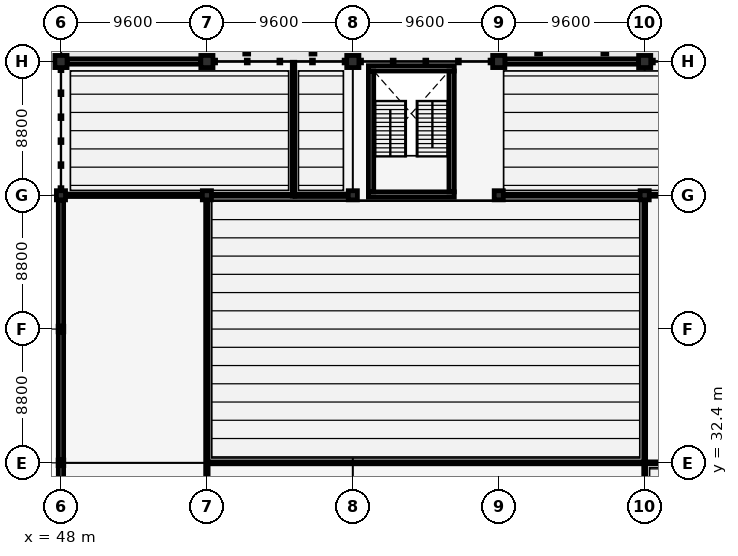
"""IFC4 building model, lengths in metres.
Left out: names, types, materials, properties, quantities, classifications, styles, units other than length and angle.
Written with IfcOpenShell. Run it as: python <this file> out.ifc"""

import sys

from ifc_helpers import new_model, si_unit, direction, frame, frame_2d, origin, origin_2d, place, context, subcontext, project, spatial, rectangle, hollow_rectangle, i_section, extrude, element, fill, save


model = new_model("IFC4")
c1 = context("Model", 3, precision=1e-05, world=origin(), true_north=direction((0.0, 1.0)))
c2 = subcontext(c1, "Body", "Model", "MODEL_VIEW")
j1 = project(units=[si_unit("LENGTHUNIT", "METRE"), si_unit("PLANEANGLEUNIT", "RADIAN")], contexts=[c1])
p1 = place(None, origin())
s1 = spatial("IfcSite", under=j1, at=p1, CompositionType="ELEMENT")
p2 = place(p1, origin())
s2 = spatial("IfcBuilding", under=s1, at=p2, CompositionType="ELEMENT")
p3 = place(p2, origin())
s3 = spatial("IfcBuildingStorey", under=s2, at=p3, CompositionType="ELEMENT", Elevation=0.0)
for number, where, z_axis, x_axis in (
    (1, (48.0, 32.4, 0.0), (0.0, 0.0, 1.0), (1.0, 0.0, 0.0)),
    (2, (48.0, 41.2, 0.0), (0.0, 0.0, 1.0), (1.0, 0.0, 0.0)),
):
    element("IfcColumn", number, at=place(p3, frame(where, z_axis=z_axis, x_axis=x_axis)), inside=s3, PredefinedType="COLUMN", context=c2, shape_type="SweptSolid", body=[
        extrude(i_section(OverallWidth=0.368, OverallDepth=0.368, WebThickness=0.015, FlangeThickness=0.024, FilletRadius=0.025, at=origin_2d()), origin(), (0.0, 0.0, 1.0), 4.8),
    ])
p4 = place(p3, frame((48.0, 50.0, 0.0), z_axis=(0.0, 0.0, 1.0), x_axis=(1.0, 0.0, 0.0)))
e3 = element("IfcColumn", 3, at=p4, inside=s3, PredefinedType="COLUMN", context=c2, shape_type="SweptSolid", body=[
    extrude(rectangle(XDim=0.6, YDim=0.6, at=origin_2d()), origin(), (0.0, 0.0, 1.0), 4.8),
])
p5 = place(p3, frame((48.0, 58.8, 0.0), z_axis=(0.0, 0.0, 1.0), x_axis=(1.0, 0.0, 0.0)))
e4 = element("IfcColumn", 4, at=p5, inside=s3, PredefinedType="COLUMN", context=c2, shape_type="SweptSolid", body=[
    extrude(rectangle(XDim=0.8, YDim=0.8, at=origin_2d()), origin(), (0.0, 0.0, 1.0), 4.8),
])
p6 = place(p3, frame((57.6, 50.0, 0.0), z_axis=(0.0, 0.0, 1.0), x_axis=(1.0, 0.0, 0.0)))
e5 = element("IfcColumn", 5, at=p6, inside=s3, PredefinedType="COLUMN", context=c2, shape_type="SweptSolid", body=[
    extrude(rectangle(XDim=0.6, YDim=0.6, at=origin_2d()), origin(), (0.0, 0.0, 1.0), 4.8),
])
p7 = place(p3, frame((57.6, 58.8, 0.0), z_axis=(0.0, 0.0, 1.0), x_axis=(1.0, 0.0, 0.0)))
e6 = element("IfcColumn", 6, at=p7, inside=s3, PredefinedType="COLUMN", context=c2, shape_type="SweptSolid", body=[
    extrude(rectangle(XDim=0.8, YDim=0.8, at=origin_2d()), origin(), (0.0, 0.0, 1.0), 4.8),
])
p8 = place(p3, frame((67.2, 50.0, 0.0), z_axis=(0.0, 0.0, 1.0), x_axis=(1.0, 0.0, 0.0)))
e7 = element("IfcColumn", 7, at=p8, inside=s3, PredefinedType="COLUMN", context=c2, shape_type="SweptSolid", body=[
    extrude(rectangle(XDim=0.6, YDim=0.6, at=origin_2d()), origin(), (0.0, 0.0, 1.0), 4.8),
])
p9 = place(p3, frame((67.2, 58.8, 0.0), z_axis=(0.0, 0.0, 1.0), x_axis=(1.0, 0.0, 0.0)))
e8 = element("IfcColumn", 8, at=p9, inside=s3, PredefinedType="COLUMN", context=c2, shape_type="SweptSolid", body=[
    extrude(rectangle(XDim=0.8, YDim=0.8, at=origin_2d()), origin(), (0.0, 0.0, 1.0), 4.8),
])
p10 = place(p3, frame((76.8, 50.0, 0.0), z_axis=(0.0, 0.0, 1.0), x_axis=(1.0, 0.0, 0.0)))
e9 = element("IfcColumn", 9, at=p10, inside=s3, PredefinedType="COLUMN", context=c2, shape_type="SweptSolid", body=[
    extrude(rectangle(XDim=0.6, YDim=0.6, at=origin_2d()), origin(), (0.0, 0.0, 1.0), 4.8),
])
p11 = place(p3, frame((76.8, 58.8, 0.0), z_axis=(0.0, 0.0, 1.0), x_axis=(1.0, 0.0, 0.0)))
e10 = element("IfcColumn", 10, at=p11, inside=s3, PredefinedType="COLUMN", context=c2, shape_type="SweptSolid", body=[
    extrude(rectangle(XDim=0.8, YDim=0.8, at=origin_2d()), origin(), (0.0, 0.0, 1.0), 4.8),
])
p12 = place(p3, frame((86.4, 50.0, 0.0), z_axis=(0.0, 0.0, 1.0), x_axis=(1.0, 0.0, 0.0)))
e11 = element("IfcColumn", 11, at=p12, inside=s3, PredefinedType="COLUMN", context=c2, shape_type="SweptSolid", body=[
    extrude(rectangle(XDim=0.6, YDim=0.6, at=origin_2d()), origin(), (0.0, 0.0, 1.0), 4.8),
])
p13 = place(p3, frame((86.4, 58.8, 0.0), z_axis=(0.0, 0.0, 1.0), x_axis=(1.0, 0.0, 0.0)))
e12 = element("IfcColumn", 12, at=p13, inside=s3, PredefinedType="COLUMN", context=c2, shape_type="SweptSolid", body=[
    extrude(rectangle(XDim=0.8, YDim=0.8, at=origin_2d()), origin(), (0.0, 0.0, 1.0), 4.8),
])
p14 = place(p3, frame((48.4, 58.8, 0.0), z_axis=(0.0, 0.0, 1.0), x_axis=(1.0, 0.0, 0.0)))
e13 = element("IfcWall", 13, at=p14, inside=s3, PredefinedType="SOLIDWALL", context=c2, shape_type="SweptSolid", body=[
    extrude(rectangle(XDim=8.8, YDim=0.35, at=frame_2d((4.4, 0.0))), origin(), (0.0, 0.0, 1.0), 4.1),
])
p15 = place(p14, frame((1.4, 0.0, 0.0)))
e14 = element("IfcOpeningElement", 14, at=p15, cuts=e13, PredefinedType="OPENING", context=c2, shape_type="SweptSolid", body=[
    extrude(rectangle(XDim=1.96, YDim=2.37, at=frame_2d((0.98, 1.185))), frame((0.0, 0.185, 0.0), z_axis=(0.0, -1.0, 0.0), x_axis=(1.0, 0.0, 0.0)), (0.0, 0.0, 1.0), 0.37),
])
p16 = place(p14, frame((4.8, 0.0, 0.0)))
e15 = element("IfcOpeningElement", 15, at=p16, cuts=e13, PredefinedType="OPENING", context=c2, shape_type="SweptSolid", body=[
    extrude(rectangle(XDim=1.72, YDim=2.34, at=frame_2d((0.86, 1.17))), frame((0.0, 0.185, 0.0), z_axis=(0.0, -1.0, 0.0), x_axis=(1.0, 0.0, 0.0)), (0.0, 0.0, 1.0), 0.37),
])
p17 = place(p3, frame((77.2, 58.8, 0.0), z_axis=(0.0, 0.0, 1.0), x_axis=(1.0, 0.0, 0.0)))
e16 = element("IfcWall", 16, at=p17, inside=s3, PredefinedType="SOLIDWALL", context=c2, shape_type="SweptSolid", body=[
    extrude(rectangle(XDim=8.8, YDim=0.35, at=frame_2d((4.4, 0.0))), origin(), (0.0, 0.0, 1.0), 4.1),
])
p18 = place(p17, frame((1.4, 0.0, 0.0)))
e17 = element("IfcOpeningElement", 17, at=p18, cuts=e16, PredefinedType="OPENING", context=c2, shape_type="SweptSolid", body=[
    extrude(rectangle(XDim=1.96, YDim=2.37, at=frame_2d((0.98, 1.185))), frame((0.0, 0.185, 0.0), z_axis=(0.0, -1.0, 0.0), x_axis=(1.0, 0.0, 0.0)), (0.0, 0.0, 1.0), 0.37),
])
p19 = place(p17, frame((4.8, 0.0, 0.0)))
e18 = element("IfcOpeningElement", 18, at=p19, cuts=e16, PredefinedType="OPENING", context=c2, shape_type="SweptSolid", body=[
    extrude(rectangle(XDim=1.72, YDim=2.34, at=frame_2d((0.86, 1.17))), frame((0.0, 0.185, 0.0), z_axis=(0.0, -1.0, 0.0), x_axis=(1.0, 0.0, 0.0)), (0.0, 0.0, 1.0), 0.37),
])
p20 = place(p3, frame((48.0, 23.784, 0.0), z_axis=(0.0, 0.0, 1.0), x_axis=(0.0, 1.0, 0.0)))
e19 = element("IfcWall", 19, at=p20, inside=s3, PredefinedType="SOLIDWALL", context=c2, shape_type="SweptSolid", body=[
    extrude(rectangle(XDim=8.432, YDim=0.35, at=frame_2d((4.216, 0.0))), origin(), (0.0, 0.0, 1.0), 4.1),
])
p21 = place(p20, frame((1.4, 0.0, 0.0)))
e20 = element("IfcOpeningElement", 20, at=p21, cuts=e19, PredefinedType="OPENING", context=c2, shape_type="SweptSolid", body=[
    extrude(rectangle(XDim=1.96, YDim=2.37, at=frame_2d((0.98, 1.185))), frame((0.0, 0.185, 0.0), z_axis=(0.0, -1.0, 0.0), x_axis=(1.0, 0.0, 0.0)), (0.0, 0.0, 1.0), 0.37),
])
p22 = place(p20, frame((4.6, 0.0, 0.0)))
e21 = element("IfcOpeningElement", 21, at=p22, cuts=e19, PredefinedType="OPENING", context=c2, shape_type="SweptSolid", body=[
    extrude(rectangle(XDim=1.72, YDim=2.34, at=frame_2d((0.86, 1.17))), frame((0.0, 0.185, 0.0), z_axis=(0.0, -1.0, 0.0), x_axis=(1.0, 0.0, 0.0)), (0.0, 0.0, 1.0), 0.37),
])
p23 = place(p3, frame((48.0, 32.584, 0.0), z_axis=(0.0, 0.0, 1.0), x_axis=(0.0, 1.0, 0.0)))
e22 = element("IfcWall", 22, at=p23, inside=s3, PredefinedType="SOLIDWALL", context=c2, shape_type="SweptSolid", body=[
    extrude(rectangle(XDim=8.432, YDim=0.35, at=frame_2d((4.216, 0.0))), origin(), (0.0, 0.0, 1.0), 4.1),
])
p24 = place(p23, frame((1.4, 0.0, 0.0)))
e23 = element("IfcOpeningElement", 23, at=p24, cuts=e22, PredefinedType="OPENING", context=c2, shape_type="SweptSolid", body=[
    extrude(rectangle(XDim=1.88, YDim=2.31, at=frame_2d((0.94, 1.155))), frame((0.0, 0.185, 0.0), z_axis=(0.0, -1.0, 0.0), x_axis=(1.0, 0.0, 0.0)), (0.0, 0.0, 1.0), 0.37),
])
p25 = place(p23, frame((4.6, 0.0, 0.0)))
e24 = element("IfcOpeningElement", 24, at=p25, cuts=e22, PredefinedType="OPENING", context=c2, shape_type="SweptSolid", body=[
    extrude(rectangle(XDim=1.8, YDim=2.4, at=frame_2d((0.9, 1.2))), frame((0.0, 0.185, 0.0), z_axis=(0.0, -1.0, 0.0), x_axis=(1.0, 0.0, 0.0)), (0.0, 0.0, 1.0), 0.37),
])
p26 = place(p3, frame((48.0, 41.384, 0.0), z_axis=(0.0, 0.0, 1.0), x_axis=(0.0, 1.0, 0.0)))
e25 = element("IfcWall", 25, at=p26, inside=s3, PredefinedType="SOLIDWALL", context=c2, shape_type="SweptSolid", body=[
    extrude(rectangle(XDim=8.316, YDim=0.35, at=frame_2d((4.158, 0.0))), origin(), (0.0, 0.0, 1.0), 4.1),
])
p27 = place(p26, frame((1.4, 0.0, 0.0)))
e26 = element("IfcOpeningElement", 26, at=p27, cuts=e25, PredefinedType="OPENING", context=c2, shape_type="SweptSolid", body=[
    extrude(rectangle(XDim=1.96, YDim=2.37, at=frame_2d((0.98, 1.185))), frame((0.0, 0.185, 0.0), z_axis=(0.0, -1.0, 0.0), x_axis=(1.0, 0.0, 0.0)), (0.0, 0.0, 1.0), 0.37),
])
p28 = place(p26, frame((4.6, 0.0, 0.0)))
e27 = element("IfcOpeningElement", 27, at=p28, cuts=e25, PredefinedType="OPENING", context=c2, shape_type="SweptSolid", body=[
    extrude(rectangle(XDim=1.72, YDim=2.34, at=frame_2d((0.86, 1.17))), frame((0.0, 0.185, 0.0), z_axis=(0.0, -1.0, 0.0), x_axis=(1.0, 0.0, 0.0)), (0.0, 0.0, 1.0), 0.37),
])
for number, where, z_axis, x_axis in (
    (28, (60.22, 59.42, 0.0), (0.0, 0.0, 1.0), (1.0, 0.0, 0.0)),
    (29, (64.58, 59.42, 0.0), (0.0, 0.0, 1.0), (1.0, 0.0, 0.0)),
    (30, (79.42, 59.42, 0.0), (0.0, 0.0, 1.0), (1.0, 0.0, 0.0)),
    (31, (83.78, 59.42, 0.0), (0.0, 0.0, 1.0), (1.0, 0.0, 0.0)),
):
    element("IfcColumn", number, at=place(p3, frame(where, z_axis=z_axis, x_axis=x_axis)), inside=s3, PredefinedType="COLUMN", context=c2, shape_type="SweptSolid", body=[
        extrude(hollow_rectangle(XDim=0.254, YDim=0.254, WallThickness=0.012, at=origin_2d()), origin(), (0.0, 0.0, 1.0), 3.47),
    ])
for number, where, z_axis, x_axis in (
    (32, (73.875, 50.05, 0.0), (0.0, 0.0, 1.0), (-1.0, 0.0, 0.0)),
    (33, (68.225, 58.35, 0.0), (0.0, 0.0, 1.0), (1.0, 0.0, 0.0)),
):
    element("IfcWall", number, at=place(p3, frame(where, z_axis=z_axis, x_axis=x_axis)), inside=s3, PredefinedType="SHEAR", context=c2, shape_type="SweptSolid", body=[
        extrude(rectangle(XDim=5.65, YDim=0.35, at=frame_2d((2.825, 0.0))), origin(), (0.0, 0.0, 1.0), 4.55),
    ])
p29 = place(p3, frame((68.4, 50.225, 0.0), z_axis=(0.0, 0.0, 1.0), x_axis=(0.0, 1.0, 0.0)))
e34 = element("IfcWall", 34, at=p29, inside=s3, PredefinedType="SHEAR", context=c2, shape_type="SweptSolid", body=[
    extrude(rectangle(XDim=7.95, YDim=0.35, at=frame_2d((3.975, 0.0))), origin(), (0.0, 0.0, 1.0), 4.55),
])
p30 = place(p29, frame((0.22, 0.0, 0.0)))
e35 = element("IfcOpeningElement", 35, at=p30, cuts=e34, PredefinedType="OPENING", context=c2, shape_type="SweptSolid", body=[
    extrude(rectangle(XDim=2.05, YDim=2.15, at=frame_2d((1.025, 1.075))), frame((0.0, 0.185, 0.0), z_axis=(0.0, -1.0, 0.0), x_axis=(1.0, 0.0, 0.0)), (0.0, 0.0, 1.0), 0.37),
])
p31 = place(p3, frame((73.7, 58.175, 0.0), z_axis=(0.0, 0.0, 1.0), x_axis=(0.0, -1.0, 0.0)))
e36 = element("IfcWall", 36, at=p31, inside=s3, PredefinedType="SHEAR", context=c2, shape_type="SweptSolid", body=[
    extrude(rectangle(XDim=7.95, YDim=0.35, at=frame_2d((3.975, 0.0))), origin(), (0.0, 0.0, 1.0), 4.55),
])
p32 = place(p3, frame((86.4, 14.9, 0.0), z_axis=(0.0, 0.0, 1.0), x_axis=(0.0, 1.0, 0.0)))
e37 = element("IfcWall", 37, at=p32, inside=s3, PredefinedType="PARTITIONING", context=c2, shape_type="SweptSolid", body=[
    extrude(rectangle(XDim=17.4, YDim=0.125, at=frame_2d((8.7, 0.0))), origin(), (0.0, 0.0, 1.0), 4.42),
])
p33 = place(p3, frame((57.7, 32.4, 0.0), z_axis=(0.0, 0.0, 1.0), x_axis=(1.0, 0.0, 0.0)))
e38 = element("IfcWall", 38, at=p33, inside=s3, PredefinedType="PARTITIONING", context=c2, shape_type="SweptSolid", body=[
    extrude(rectangle(XDim=28.6, YDim=0.125, at=frame_2d((14.3, 0.0))), origin(), (0.0, 0.0, 1.0), 4.42),
])
p34 = place(p3, frame((57.6, 15.4, 0.0), z_axis=(0.0, 0.0, 1.0), x_axis=(0.0, 1.0, 0.0)))
e39 = element("IfcWall", 39, at=p34, inside=s3, PredefinedType="PARTITIONING", context=c2, shape_type="SweptSolid", body=[
    extrude(rectangle(XDim=16.9, YDim=0.16, at=frame_2d((8.45, 0.0))), origin(), (0.0, 0.0, 1.0), 4.42),
])
p35 = place(p34, frame((7.55, 0.0, 0.0)))
e40 = element("IfcOpeningElement", 40, at=p35, cuts=e39, PredefinedType="OPENING", context=c2, shape_type="SweptSolid", body=[
    extrude(rectangle(XDim=1.8, YDim=2.15, at=frame_2d((0.9, 1.075))), frame((0.0, 0.09, 0.0), z_axis=(0.0, -1.0, 0.0), x_axis=(1.0, 0.0, 0.0)), (0.0, 0.0, 1.0), 0.18),
])
p36 = place(p3, frame((86.5, 32.4, 0.0), z_axis=(0.0, 0.0, 1.0), x_axis=(1.0, 0.0, 0.0)))
e41 = element("IfcWall", 41, at=p36, inside=s3, PredefinedType="PARTITIONING", context=c2, shape_type="SweptSolid", body=[
    extrude(rectangle(XDim=28.65, YDim=0.125, at=frame_2d((14.325, 0.0))), origin(), (0.0, 0.0, 1.0), 4.42),
])
p37 = place(p3, frame((86.4, 32.5, 0.0), z_axis=(0.0, 0.0, 1.0), x_axis=(0.0, 1.0, 0.0)))
e42 = element("IfcWall", 42, at=p37, inside=s3, PredefinedType="PARTITIONING", context=c2, shape_type="SweptSolid", body=[
    extrude(rectangle(XDim=17.45, YDim=0.125, at=frame_2d((8.725, 0.0))), origin(), (0.0, 0.0, 1.0), 4.42),
])
p38 = place(p3, frame((76.9, 50.0, 0.0), z_axis=(0.0, 0.0, 1.0), x_axis=(1.0, 0.0, 0.0)))
e43 = element("IfcWall", 43, at=p38, inside=s3, PredefinedType="PARTITIONING", context=c2, shape_type="SweptSolid", body=[
    extrude(rectangle(XDim=9.4, YDim=0.125, at=frame_2d((4.7, 0.0))), origin(), (0.0, 0.0, 1.0), 3.925),
])
p39 = place(p3, frame((57.7, 50.0, 0.0), z_axis=(0.0, 0.0, 1.0), x_axis=(1.0, 0.0, 0.0)))
e44 = element("IfcWall", 44, at=p39, inside=s3, PredefinedType="PARTITIONING", context=c2, shape_type="SweptSolid", body=[
    extrude(rectangle(XDim=5.5, YDim=0.125, at=frame_2d((2.75, 0.0))), origin(), (0.0, 0.0, 1.0), 3.925),
])
p40 = place(p3, frame((57.6, 32.5, 0.0), z_axis=(0.0, 0.0, 1.0), x_axis=(0.0, 1.0, 0.0)))
e45 = element("IfcWall", 45, at=p40, inside=s3, PredefinedType="PARTITIONING", context=c2, shape_type="SweptSolid", body=[
    extrude(rectangle(XDim=17.45, YDim=0.16, at=frame_2d((8.725, 0.0))), origin(), (0.0, 0.0, 1.0), 4.42),
])
p41 = place(p40, frame((7.825, 0.0, 0.0)))
e46 = element("IfcOpeningElement", 46, at=p41, cuts=e45, PredefinedType="OPENING", context=c2, shape_type="SweptSolid", body=[
    extrude(rectangle(XDim=1.8, YDim=2.15, at=frame_2d((0.9, 1.075))), frame((0.0, 0.09, 0.0), z_axis=(0.0, -1.0, 0.0), x_axis=(1.0, 0.0, 0.0)), (0.0, 0.0, 1.0), 0.18),
])
p42 = place(p3, frame((63.4, 50.0, 0.0), z_axis=(0.0, 0.0, 1.0), x_axis=(1.0, 0.0, 0.0)))
e47 = element("IfcWall", 47, at=p42, inside=s3, PredefinedType="PARTITIONING", context=c2, shape_type="SweptSolid", body=[
    extrude(rectangle(XDim=3.4, YDim=0.16, at=frame_2d((1.7, 0.0))), origin(), (0.0, 0.0, 1.0), 3.925),
])
p43 = place(p42, frame((0.712, 0.0, 0.0)))
e48 = element("IfcOpeningElement", 48, at=p43, cuts=e47, PredefinedType="OPENING", context=c2, shape_type="SweptSolid", body=[
    extrude(rectangle(XDim=1.8, YDim=2.15, at=frame_2d((0.9, 1.075))), frame((0.0, 0.09, 0.0), z_axis=(0.0, -1.0, 0.0), x_axis=(1.0, 0.0, 0.0)), (0.0, 0.0, 1.0), 0.18),
])
p44 = place(p3, frame((86.5, 50.0, 0.0), z_axis=(0.0, 0.0, 1.0), x_axis=(1.0, 0.0, 0.0)))
e49 = element("IfcWall", 49, at=p44, inside=s3, PredefinedType="PARTITIONING", context=c2, shape_type="SweptSolid", body=[
    extrude(rectangle(XDim=24.3, YDim=0.125, at=frame_2d((12.15, 0.0))), origin(), (0.0, 0.0, 1.0), 3.925),
])
p45 = place(p3, frame((48.05, 50.0, 0.0), z_axis=(0.0, 0.0, 1.0), x_axis=(1.0, 0.0, 0.0)))
e50 = element("IfcWall", 50, at=p45, inside=s3, PredefinedType="PARTITIONING", context=c2, shape_type="SweptSolid", body=[
    extrude(rectangle(XDim=9.45, YDim=0.16, at=frame_2d((4.725, 0.0))), origin(), (0.0, 0.0, 1.0), 3.925),
])
p46 = place(p45, frame((3.825, 0.0, 0.0)))
e51 = element("IfcOpeningElement", 51, at=p46, cuts=e50, PredefinedType="OPENING", context=c2, shape_type="SweptSolid", body=[
    extrude(rectangle(XDim=1.8, YDim=2.15, at=frame_2d((0.9, 1.075))), frame((0.0, 0.09, 0.0), z_axis=(0.0, -1.0, 0.0), x_axis=(1.0, 0.0, 0.0)), (0.0, 0.0, 1.0), 0.18),
])
p47 = place(p3, frame((63.3, 49.95, 0.0), z_axis=(0.0, 0.0, 1.0), x_axis=(0.0, 1.0, 0.0)))
e52 = element("IfcWall", 52, at=p47, inside=s3, PredefinedType="PARTITIONING", context=c2, shape_type="SweptSolid", body=[
    extrude(rectangle(XDim=8.8, YDim=0.16, at=frame_2d((4.4, 0.0))), origin(), (0.0, 0.0, 1.0), 4.42),
])
p48 = place(p47, frame((3.5, 0.0, 0.0)))
e53 = element("IfcOpeningElement", 53, at=p48, cuts=e52, PredefinedType="OPENING", context=c2, shape_type="SweptSolid", body=[
    extrude(rectangle(XDim=1.8, YDim=2.15, at=frame_2d((0.9, 1.075))), frame((0.0, 0.09, 0.0), z_axis=(0.0, -1.0, 0.0), x_axis=(1.0, 0.0, 0.0)), (0.0, 0.0, 1.0), 0.18),
])
p49 = place(p15, origin())
e54 = element("IfcDoor", 54, at=p49, inside=s3, OperationType="DOUBLE_DOOR_SINGLE_SWING", PredefinedType="DOOR", context=c2, shape_type="SweptSolid", body=[
    extrude(rectangle(XDim=1.96, YDim=2.37, at=frame_2d((0.98, 1.185))), frame((0.0, 0.025, 0.0), z_axis=(0.0, -1.0, 0.0), x_axis=(1.0, 0.0, 0.0)), (0.0, 0.0, 1.0), 0.05),
])
fill(e14, e54)
p50 = place(p16, origin())
e55 = element("IfcDoor", 55, at=p50, inside=s3, OperationType="DOUBLE_DOOR_SINGLE_SWING", PredefinedType="DOOR", context=c2, shape_type="SweptSolid", body=[
    extrude(rectangle(XDim=1.72, YDim=2.34, at=frame_2d((0.86, 1.17))), frame((0.0, 0.025, 0.0), z_axis=(0.0, -1.0, 0.0), x_axis=(1.0, 0.0, 0.0)), (0.0, 0.0, 1.0), 0.05),
])
fill(e15, e55)
p51 = place(p18, origin())
e56 = element("IfcDoor", 56, at=p51, inside=s3, OperationType="DOUBLE_DOOR_SINGLE_SWING", PredefinedType="DOOR", context=c2, shape_type="SweptSolid", body=[
    extrude(rectangle(XDim=1.96, YDim=2.37, at=frame_2d((0.98, 1.185))), frame((0.0, 0.025, 0.0), z_axis=(0.0, -1.0, 0.0), x_axis=(1.0, 0.0, 0.0)), (0.0, 0.0, 1.0), 0.05),
])
fill(e17, e56)
p52 = place(p19, origin())
e57 = element("IfcDoor", 57, at=p52, inside=s3, OperationType="DOUBLE_DOOR_SINGLE_SWING", PredefinedType="DOOR", context=c2, shape_type="SweptSolid", body=[
    extrude(rectangle(XDim=1.72, YDim=2.34, at=frame_2d((0.86, 1.17))), frame((0.0, 0.025, 0.0), z_axis=(0.0, -1.0, 0.0), x_axis=(1.0, 0.0, 0.0)), (0.0, 0.0, 1.0), 0.05),
])
fill(e18, e57)
p53 = place(p24, origin())
e58 = element("IfcDoor", 58, at=p53, inside=s3, OperationType="DOUBLE_DOOR_SINGLE_SWING", PredefinedType="DOOR", context=c2, shape_type="SweptSolid", body=[
    extrude(rectangle(XDim=1.88, YDim=2.31, at=frame_2d((0.94, 1.155))), frame((0.0, 0.025, 0.0), z_axis=(0.0, -1.0, 0.0), x_axis=(1.0, 0.0, 0.0)), (0.0, 0.0, 1.0), 0.05),
])
fill(e23, e58)
p54 = place(p25, origin())
e59 = element("IfcDoor", 59, at=p54, inside=s3, OperationType="DOUBLE_DOOR_SINGLE_SWING", PredefinedType="DOOR", context=c2, shape_type="SweptSolid", body=[
    extrude(rectangle(XDim=1.8, YDim=2.4, at=frame_2d((0.9, 1.2))), frame((0.0, 0.025, 0.0), z_axis=(0.0, -1.0, 0.0), x_axis=(1.0, 0.0, 0.0)), (0.0, 0.0, 1.0), 0.05),
])
fill(e24, e59)
p55 = place(p27, origin())
e60 = element("IfcDoor", 60, at=p55, inside=s3, OperationType="DOUBLE_DOOR_SINGLE_SWING", PredefinedType="DOOR", context=c2, shape_type="SweptSolid", body=[
    extrude(rectangle(XDim=1.96, YDim=2.37, at=frame_2d((0.98, 1.185))), frame((0.0, 0.025, 0.0), z_axis=(0.0, -1.0, 0.0), x_axis=(1.0, 0.0, 0.0)), (0.0, 0.0, 1.0), 0.05),
])
fill(e26, e60)
p56 = place(p28, origin())
e61 = element("IfcDoor", 61, at=p56, inside=s3, OperationType="DOUBLE_DOOR_SINGLE_SWING", PredefinedType="DOOR", context=c2, shape_type="SweptSolid", body=[
    extrude(rectangle(XDim=1.72, YDim=2.34, at=frame_2d((0.86, 1.17))), frame((0.0, 0.025, 0.0), z_axis=(0.0, -1.0, 0.0), x_axis=(1.0, 0.0, 0.0)), (0.0, 0.0, 1.0), 0.05),
])
fill(e27, e61)
p57 = place(p30, origin())
e62 = element("IfcDoor", 62, at=p57, inside=s3, OperationType="DOUBLE_DOOR_SINGLE_SWING", PredefinedType="DOOR", context=c2, shape_type="SweptSolid", body=[
    extrude(rectangle(XDim=2.05, YDim=2.15, at=frame_2d((1.025, 1.075))), frame((0.0, 0.025, 0.0), z_axis=(0.0, -1.0, 0.0), x_axis=(1.0, 0.0, 0.0)), (0.0, 0.0, 1.0), 0.05),
])
fill(e35, e62)
p58 = place(p41, origin())
e63 = element("IfcDoor", 63, at=p58, inside=s3, OperationType="DOUBLE_DOOR_SINGLE_SWING", PredefinedType="DOOR", context=c2, shape_type="SweptSolid", body=[
    extrude(rectangle(XDim=1.8, YDim=2.15, at=frame_2d((0.9, 1.075))), frame((0.0, 0.025, 0.0), z_axis=(0.0, -1.0, 0.0), x_axis=(1.0, 0.0, 0.0)), (0.0, 0.0, 1.0), 0.05),
])
fill(e46, e63)
p59 = place(p43, origin())
e64 = element("IfcDoor", 64, at=p59, inside=s3, OperationType="DOUBLE_DOOR_SINGLE_SWING", PredefinedType="DOOR", context=c2, shape_type="SweptSolid", body=[
    extrude(rectangle(XDim=1.8, YDim=2.15, at=frame_2d((0.9, 1.075))), frame((0.0, 0.025, 0.0), z_axis=(0.0, -1.0, 0.0), x_axis=(1.0, 0.0, 0.0)), (0.0, 0.0, 1.0), 0.05),
])
fill(e48, e64)
p60 = place(p46, origin())
e65 = element("IfcDoor", 65, at=p60, inside=s3, OperationType="DOUBLE_DOOR_SINGLE_SWING", PredefinedType="DOOR", context=c2, shape_type="SweptSolid", body=[
    extrude(rectangle(XDim=1.8, YDim=2.15, at=frame_2d((0.9, 1.075))), frame((0.0, 0.025, 0.0), z_axis=(0.0, -1.0, 0.0), x_axis=(1.0, 0.0, 0.0)), (0.0, 0.0, 1.0), 0.05),
])
fill(e51, e65)
p61 = place(p48, origin())
e66 = element("IfcDoor", 66, at=p61, inside=s3, OperationType="DOUBLE_DOOR_SINGLE_SWING", PredefinedType="DOOR", context=c2, shape_type="SweptSolid", body=[
    extrude(rectangle(XDim=1.8, YDim=2.15, at=frame_2d((0.9, 1.075))), frame((0.0, 0.025, 0.0), z_axis=(0.0, -1.0, 0.0), x_axis=(1.0, 0.0, 0.0)), (0.0, 0.0, 1.0), 0.05),
])
fill(e53, e66)
save(model, sys.argv[1])
